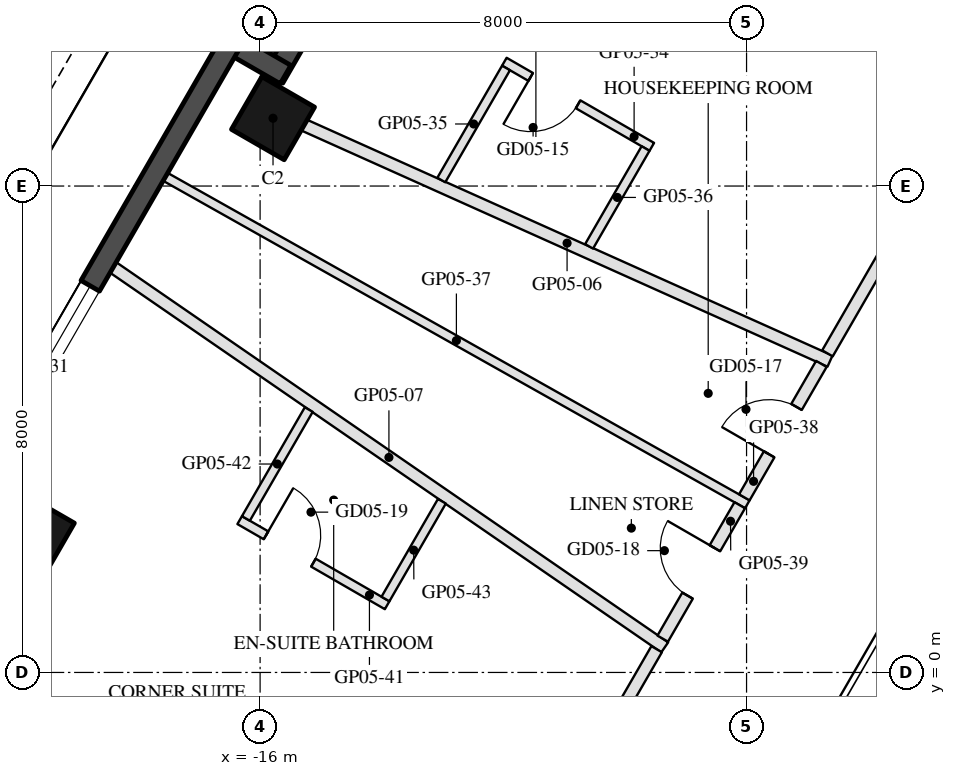
"""IFC4 building model, lengths in metres.
Left out: names, types, materials, properties, quantities, classifications, styles, units other than length and angle.
Written with IfcOpenShell. Run it as: python <this file> out.ifc"""

import sys

from ifc_helpers import new_model, si_unit, direction, frame, frame_2d, origin, origin_2d, place, context, subcontext, project, spatial, rectangle, hollow_rectangle, extrude, element, fill, save


model = new_model("IFC4")
c1 = context("Model", 3, precision=1e-05, world=origin(), true_north=direction((0.0, 1.0)))
c2 = subcontext(c1, "Body", "Model", "MODEL_VIEW")
j1 = project(units=[si_unit("LENGTHUNIT", "METRE"), si_unit("PLANEANGLEUNIT", "RADIAN")], contexts=[c1])
p1 = place(None, origin())
s1 = spatial("IfcSite", under=j1, at=p1, CompositionType="ELEMENT")
p2 = place(p1, origin())
s2 = spatial("IfcBuilding", under=s1, at=p2, CompositionType="ELEMENT")
p3 = place(p2, frame((0.0, 0.0, 83.5)))
s3 = spatial("IfcBuildingStorey", under=s2, at=p3, CompositionType="ELEMENT", Elevation=83.5)
for number, where, z_axis, x_axis in (
    (1, (-15.788, 9.115, 0.0), (0.0, 0.0, 1.0), (0.5, 0.866, 0.0)),
    (2, (-19.738, 2.273, 0.0), (0.0, 0.0, 1.0), (0.5, 0.866, 0.0)),
):
    element("IfcColumn", number, at=place(p3, frame(where, z_axis=z_axis, x_axis=x_axis)), inside=s3, PredefinedType="COLUMN", context=c2, shape_type="SweptSolid", body=[
        extrude(hollow_rectangle(XDim=1.0, YDim=1.0, WallThickness=0.045, at=origin_2d()), origin(), (0.0, 0.0, 1.0), 3.7),
    ])
p4 = place(p3, frame((-12.409, 15.617, 0.0), z_axis=(0.0, 0.0, 1.0), x_axis=(-0.500003597184, -0.866023326939, 0.0)))
e3 = element("IfcWall", 3, at=p4, inside=s3, PredefinedType="SOLIDWALL", context=c2, shape_type="SweptSolid", body=[
    extrude(rectangle(XDim=6.74, YDim=0.35, at=frame_2d((3.37, 0.0))), origin(), (0.0, 0.0, 1.0), 3.55),
])
p5 = place(p4, frame((0.32, 0.0, 0.3)))
e4 = element("IfcOpeningElement", 4, at=p5, cuts=e3, PredefinedType="OPENING", context=c2, shape_type="SweptSolid", body=[
    extrude(rectangle(XDim=2.6, YDim=2.65, at=frame_2d((1.3, 1.325))), frame((0.0, 0.185, 0.0), z_axis=(0.0, -1.0, 0.0), x_axis=(1.0, 0.0, 0.0)), (0.0, 0.0, 1.0), 0.37),
])
p6 = place(p4, frame((3.22, 0.0, 0.3)))
e5 = element("IfcOpeningElement", 5, at=p6, cuts=e3, PredefinedType="OPENING", context=c2, shape_type="SweptSolid", body=[
    extrude(rectangle(XDim=2.6, YDim=2.65, at=frame_2d((1.3, 1.325))), frame((0.0, 0.185, 0.0), z_axis=(0.0, -1.0, 0.0), x_axis=(1.0, 0.0, 0.0)), (0.0, 0.0, 1.0), 0.37),
])
p7 = place(p3, frame((-15.581, 9.833, 0.0), z_axis=(0.0, 0.0, 1.0), x_axis=(-0.866055662726, 0.499947586314, 0.0)))
e6 = element("IfcWall", 6, at=p7, inside=s3, PredefinedType="SOLIDWALL", context=c2, shape_type="SweptSolid", body=[
    extrude(rectangle(XDim=1.22, YDim=0.35, at=frame_2d((0.61, 0.0))), origin(), (0.0, 0.0, 1.0), 3.55),
])
p8 = place(p3, frame((-16.398, 10.507, 0.0), z_axis=(0.0, 0.0, 1.0), x_axis=(-0.499999142773, -0.866025898704, 0.0)))
e7 = element("IfcWall", 7, at=p8, inside=s3, PredefinedType="SOLIDWALL", context=c2, shape_type="SweptSolid", body=[
    extrude(rectangle(XDim=9.7, YDim=0.35, at=frame_2d((4.85, 0.0))), origin(), (0.0, 0.0, 1.0), 3.55),
])
p9 = place(p8, frame((4.79, 0.0, 0.3)))
e8 = element("IfcOpeningElement", 8, at=p9, cuts=e7, PredefinedType="OPENING", context=c2, shape_type="SweptSolid", body=[
    extrude(rectangle(XDim=3.1, YDim=2.65, at=frame_2d((1.55, 1.325))), frame((0.0, 0.185, 0.0), z_axis=(0.0, -1.0, 0.0), x_axis=(1.0, 0.0, 0.0)), (0.0, 0.0, 1.0), 0.37),
])
p10 = place(p3, frame((-15.275, 9.002, 0.0), z_axis=(0.0, 0.0, 1.0), x_axis=(0.912310970981, -0.409498097954, 0.0)))
e9 = element("IfcWall", 9, at=p10, inside=s3, PredefinedType="PARTITIONING", context=c2, shape_type="SweptSolid", body=[
    extrude(rectangle(XDim=9.479, YDim=0.2, at=frame_2d((4.74, 0.0))), origin(), (0.0, 0.0, 1.0), 2.95),
])
p11 = place(p3, frame((-18.417, 6.661, 0.0), z_axis=(0.0, 0.0, 1.0), x_axis=(0.823524858714, -0.56728018393, 0.0)))
e10 = element("IfcWall", 10, at=p11, inside=s3, PredefinedType="PARTITIONING", context=c2, shape_type="SweptSolid", body=[
    extrude(rectangle(XDim=11.015, YDim=0.2, at=frame_2d((5.507, 0.0))), origin(), (0.0, 0.0, 1.0), 2.95),
])
p12 = place(p3, frame((-6.669, 5.249, 0.0), z_axis=(0.0, 0.0, 1.0), x_axis=(0.499992114976, 0.866029956157, 0.0)))
e11 = element("IfcWall", 11, at=p12, inside=s3, PredefinedType="PARTITIONING", context=c2, shape_type="SweptSolid", body=[
    extrude(rectangle(XDim=8.778, YDim=0.2, at=frame_2d((4.389, 0.0))), origin(), (0.0, 0.0, 1.0), 2.95),
])
p13 = place(p12, frame((3.889, 0.0, 0.0)))
e12 = element("IfcOpeningElement", 12, at=p13, cuts=e11, PredefinedType="OPENING", context=c2, shape_type="SweptSolid", body=[
    extrude(rectangle(XDim=1.0, YDim=2.1, at=frame_2d((0.5, 1.05))), frame((0.0, 0.11, 0.0), z_axis=(0.0, -1.0, 0.0), x_axis=(1.0, 0.0, 0.0)), (0.0, 0.0, 1.0), 0.22),
])
p14 = place(p3, frame((-9.558, 8.645, 0.0), z_axis=(0.0, 0.0, 1.0), x_axis=(-0.866034573852, 0.49998411664, 0.0)))
e13 = element("IfcWall", 13, at=p14, inside=s3, PredefinedType="PARTITIONING", context=c2, shape_type="SweptSolid", body=[
    extrude(rectangle(XDim=2.8, YDim=0.15, at=frame_2d((1.4, 0.0))), origin(), (0.0, 0.0, 1.0), 3.55),
])
p15 = place(p14, frame((1.4, 0.0, 0.0)))
e14 = element("IfcOpeningElement", 14, at=p15, cuts=e13, PredefinedType="OPENING", context=c2, shape_type="SweptSolid", body=[
    extrude(rectangle(XDim=0.9, YDim=2.1, at=frame_2d((0.45, 1.05))), frame((0.0, 0.085, 0.0), z_axis=(0.0, -1.0, 0.0), x_axis=(1.0, 0.0, 0.0)), (0.0, 0.0, 1.0), 0.17),
])
p16 = place(p3, frame((-11.956, 9.942, 0.0), z_axis=(0.0, 0.0, 1.0), x_axis=(-0.50001378257, -0.866017446268, 0.0)))
e15 = element("IfcWall", 15, at=p16, inside=s3, PredefinedType="PARTITIONING", context=c2, shape_type="SweptSolid", body=[
    extrude(rectangle(XDim=2.128, YDim=0.15, at=frame_2d((1.064, 0.0))), origin(), (0.0, 0.0, 1.0), 3.55),
])
p17 = place(p3, frame((-9.661, 8.617, 0.0), z_axis=(0.0, 0.0, 1.0), x_axis=(-0.499984136491, -0.866034562392, 0.0)))
e16 = element("IfcWall", 16, at=p17, inside=s3, PredefinedType="PARTITIONING", context=c2, shape_type="SweptSolid", body=[
    extrude(rectangle(XDim=1.857, YDim=0.15, at=frame_2d((0.929, 0.0))), origin(), (0.0, 0.0, 1.0), 3.55),
])
p18 = place(p3, frame((-17.557, 8.15, 0.0), z_axis=(0.0, 0.0, 1.0), x_axis=(0.87154168957, -0.490321408202, 0.0)))
e17 = element("IfcWall", 17, at=p18, inside=s3, PredefinedType="PARTITIONING", context=c2, shape_type="SweptSolid", body=[
    extrude(rectangle(XDim=10.981, YDim=0.15, at=frame_2d((5.49, 0.0))), origin(), (0.0, 0.0, 1.0), 2.96),
])
p19 = place(p3, frame((-8.037, 2.88, 0.0), z_axis=(0.0, 0.0, 1.0), x_axis=(0.500025521233, 0.866010668592, 0.0)))
e18 = element("IfcWall", 18, at=p19, inside=s3, PredefinedType="PARTITIONING", context=c2, shape_type="SweptSolid", body=[
    extrude(rectangle(XDim=2.533, YDim=0.2, at=frame_2d((1.267, 0.0))), origin(), (0.0, 0.0, 1.0), 2.95),
])
p20 = place(p19, frame((0.817, 0.0, 0.0)))
e19 = element("IfcOpeningElement", 19, at=p20, cuts=e18, PredefinedType="OPENING", context=c2, shape_type="SweptSolid", body=[
    extrude(rectangle(XDim=0.9, YDim=2.1, at=frame_2d((0.45, 1.05))), frame((0.0, 0.11, 0.0), z_axis=(0.0, -1.0, 0.0), x_axis=(1.0, 0.0, 0.0)), (0.0, 0.0, 1.0), 0.22),
])
p21 = place(p3, frame((-9.378, 0.556, 0.0), z_axis=(0.0, 0.0, 1.0), x_axis=(0.499983796486, 0.866034758685, 0.0)))
e20 = element("IfcWall", 20, at=p21, inside=s3, PredefinedType="PARTITIONING", context=c2, shape_type="SweptSolid", body=[
    extrude(rectangle(XDim=2.534, YDim=0.2, at=frame_2d((1.267, 0.0))), origin(), (0.0, 0.0, 1.0), 2.95),
])
p22 = place(p21, frame((0.817, 0.0, 0.0)))
e21 = element("IfcOpeningElement", 21, at=p22, cuts=e20, PredefinedType="OPENING", context=c2, shape_type="SweptSolid", body=[
    extrude(rectangle(XDim=0.9, YDim=2.1, at=frame_2d((0.45, 1.05))), frame((0.0, 0.11, 0.0), z_axis=(0.0, -1.0, 0.0), x_axis=(1.0, 0.0, 0.0)), (0.0, 0.0, 1.0), 0.22),
])
p23 = place(p3, frame((-12.269, -4.45, 0.0), z_axis=(0.0, 0.0, 1.0), x_axis=(0.500016608416, 0.866015814699, 0.0)))
e22 = element("IfcWall", 22, at=p23, inside=s3, PredefinedType="PARTITIONING", context=c2, shape_type="SweptSolid", body=[
    extrude(rectangle(XDim=5.58, YDim=0.2, at=frame_2d((2.79, 0.0))), origin(), (0.0, 0.0, 1.0), 2.95),
])
p24 = place(p23, frame((2.29, 0.0, 0.0)))
e23 = element("IfcOpeningElement", 23, at=p24, cuts=e22, PredefinedType="OPENING", context=c2, shape_type="SweptSolid", body=[
    extrude(rectangle(XDim=1.0, YDim=2.1, at=frame_2d((0.5, 1.05))), frame((0.0, 0.11, 0.0), z_axis=(0.0, -1.0, 0.0), x_axis=(1.0, 0.0, 0.0)), (0.0, 0.0, 1.0), 0.22),
])
p25 = place(p3, frame((-16.336, 2.505, 0.0), z_axis=(0.0, 0.0, 1.0), x_axis=(0.866056369097, -0.49994636267, 0.0)))
e24 = element("IfcWall", 24, at=p25, inside=s3, PredefinedType="PARTITIONING", context=c2, shape_type="SweptSolid", body=[
    extrude(rectangle(XDim=2.8, YDim=0.15, at=frame_2d((1.4, 0.0))), origin(), (0.0, 0.0, 1.0), 3.55),
])
p26 = place(p25, frame((0.5, 0.0, 0.0)))
e25 = element("IfcOpeningElement", 25, at=p26, cuts=e24, PredefinedType="OPENING", context=c2, shape_type="SweptSolid", body=[
    extrude(rectangle(XDim=0.9, YDim=2.1, at=frame_2d((0.45, 1.05))), frame((0.0, 0.085, 0.0), z_axis=(0.0, -1.0, 0.0), x_axis=(1.0, 0.0, 0.0)), (0.0, 0.0, 1.0), 0.17),
])
p27 = place(p3, frame((-15.2, 4.323, 0.0), z_axis=(0.0, 0.0, 1.0), x_axis=(-0.499974592989, -0.866040072032, 0.0)))
e26 = element("IfcWall", 26, at=p27, inside=s3, PredefinedType="PARTITIONING", context=c2, shape_type="SweptSolid", body=[
    extrude(rectangle(XDim=2.067, YDim=0.15, at=frame_2d((1.034, 0.0))), origin(), (0.0, 0.0, 1.0), 2.95),
])
p28 = place(p3, frame((-13.01, 2.815, 0.0), z_axis=(0.0, 0.0, 1.0), x_axis=(-0.499972951856, -0.866041019474, 0.0)))
e27 = element("IfcWall", 27, at=p28, inside=s3, PredefinedType="PARTITIONING", context=c2, shape_type="SweptSolid", body=[
    extrude(rectangle(XDim=1.856, YDim=0.15, at=frame_2d((0.928, 0.0))), origin(), (0.0, 0.0, 1.0), 3.55),
])
p29 = place(p9, origin())
e28 = element("IfcWindow", 28, at=p29, inside=s3, PartitioningType="SINGLE_PANEL", PredefinedType="WINDOW", context=c2, shape_type="SweptSolid", body=[
    extrude(rectangle(XDim=3.1, YDim=2.65, at=frame_2d((1.55, 1.325))), frame((0.0, 0.03, 0.0), z_axis=(0.0, -1.0, 0.0), x_axis=(1.0, 0.0, 0.0)), (0.0, 0.0, 1.0), 0.06),
])
fill(e8, e28)
p30 = place(p15, origin())
e29 = element("IfcDoor", 29, at=p30, inside=s3, OperationType="SINGLE_SWING_RIGHT", PredefinedType="DOOR", context=c2, shape_type="SweptSolid", body=[
    extrude(rectangle(XDim=0.9, YDim=2.1, at=frame_2d((0.45, 1.05))), frame((0.0, 0.025, 0.0), z_axis=(0.0, -1.0, 0.0), x_axis=(1.0, 0.0, 0.0)), (0.0, 0.0, 1.0), 0.05),
])
fill(e14, e29)
p31 = place(p20, origin())
e30 = element("IfcDoor", 30, at=p31, inside=s3, OperationType="SINGLE_SWING_LEFT", PredefinedType="DOOR", context=c2, shape_type="SweptSolid", body=[
    extrude(rectangle(XDim=0.9, YDim=2.1, at=frame_2d((0.45, 1.05))), frame((0.0, 0.025, 0.0), z_axis=(0.0, -1.0, 0.0), x_axis=(1.0, 0.0, 0.0)), (0.0, 0.0, 1.0), 0.05),
])
fill(e19, e30)
p32 = place(p22, origin())
e31 = element("IfcDoor", 31, at=p32, inside=s3, OperationType="SINGLE_SWING_RIGHT", PredefinedType="DOOR", context=c2, shape_type="SweptSolid", body=[
    extrude(rectangle(XDim=0.9, YDim=2.1, at=frame_2d((0.45, 1.05))), frame((0.0, 0.025, 0.0), z_axis=(0.0, -1.0, 0.0), x_axis=(1.0, 0.0, 0.0)), (0.0, 0.0, 1.0), 0.05),
])
fill(e21, e31)
p33 = place(p26, origin())
e32 = element("IfcDoor", 32, at=p33, inside=s3, OperationType="SINGLE_SWING_LEFT", PredefinedType="DOOR", context=c2, shape_type="SweptSolid", body=[
    extrude(rectangle(XDim=0.9, YDim=2.1, at=frame_2d((0.45, 1.05))), frame((0.0, 0.025, 0.0), z_axis=(0.0, -1.0, 0.0), x_axis=(1.0, 0.0, 0.0)), (0.0, 0.0, 1.0), 0.05),
])
fill(e25, e32)
save(model, sys.argv[1])
